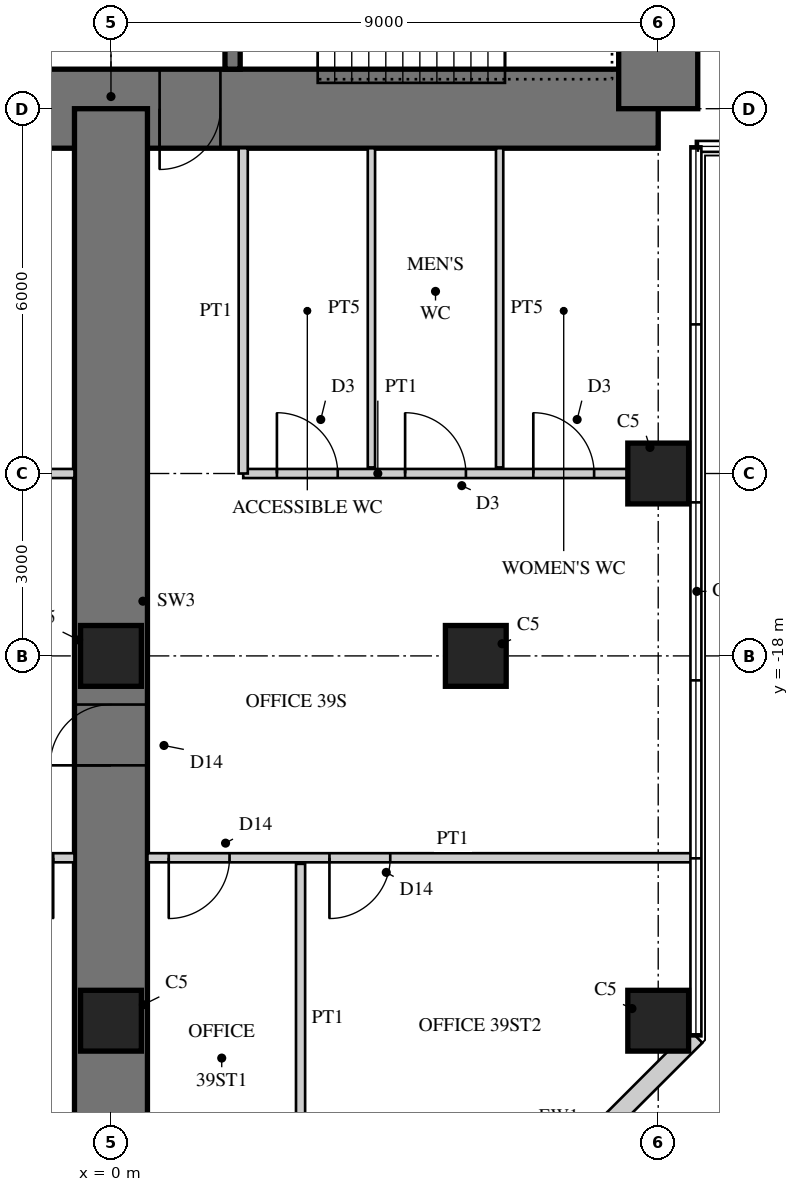
"""IFC4 building model, lengths in metres.
Left out: names, types, materials, properties, quantities, classifications, styles, units other than length and angle.
Written with IfcOpenShell. Run it as: python <this file> out.ifc"""

import sys

from ifc_helpers import new_model, si_unit, direction, frame, frame_2d, origin, origin_2d, place, context, subcontext, project, spatial, rectangle, extrude, element, fill, save


model = new_model("IFC4")
c1 = context("Model", 3, precision=1e-05, world=origin(), true_north=direction((0.0, 1.0)))
c2 = subcontext(c1, "Body", "Model", "MODEL_VIEW")
j1 = project(units=[si_unit("LENGTHUNIT", "METRE"), si_unit("PLANEANGLEUNIT", "RADIAN")], contexts=[c1])
p1 = place(None, origin())
s1 = spatial("IfcSite", under=j1, at=p1, CompositionType="ELEMENT")
p2 = place(p1, origin())
s2 = spatial("IfcBuilding", under=s1, at=p2, CompositionType="ELEMENT")
p3 = place(p2, frame((0.0, 0.0, 160.5)))
s3 = spatial("IfcBuildingStorey", under=s2, at=p3, CompositionType="ELEMENT", Elevation=160.5)
p4 = place(p3, frame((-9.0, -9.0, 0.0), z_axis=(0.0, 0.0, 1.0), x_axis=(1.0, 0.0, 0.0)))
e1 = element("IfcWall", 1, at=p4, inside=s3, PredefinedType="SHEAR", context=c2, shape_type="SweptSolid", body=[
    extrude(rectangle(XDim=18.0, YDim=1.3, at=frame_2d((9.0, 0.0))), origin(), (0.0, 0.0, 1.0), 4.0),
])
p5 = place(p4, frame((9.8, 0.0, 0.0)))
e2 = element("IfcOpeningElement", 2, at=p5, cuts=e1, PredefinedType="OPENING", context=c2, shape_type="SweptSolid", body=[
    extrude(rectangle(XDim=1.0, YDim=2.4, at=frame_2d((0.5, 1.2))), frame((0.0, 0.66, 0.0), z_axis=(0.0, -1.0, 0.0), x_axis=(1.0, 0.0, 0.0)), (0.0, 0.0, 1.0), 1.32),
])
p6 = place(p3, frame((9.0, -9.0, 0.0), z_axis=(0.0, 0.0, 1.0), x_axis=(0.0, 1.0, 0.0)))
e3 = element("IfcWall", 3, at=p6, inside=s3, PredefinedType="SHEAR", context=c2, shape_type="SweptSolid", body=[
    extrude(rectangle(XDim=18.0, YDim=1.3, at=frame_2d((9.0, 0.0))), origin(), (0.0, 0.0, 1.0), 4.0),
])
p7 = place(p6, frame((9.8, 0.0, 0.0)))
e4 = element("IfcOpeningElement", 4, at=p7, cuts=e3, PredefinedType="OPENING", context=c2, shape_type="SweptSolid", body=[
    extrude(rectangle(XDim=1.0, YDim=2.4, at=frame_2d((0.5, 1.2))), frame((0.0, 0.66, 0.0), z_axis=(0.0, -1.0, 0.0), x_axis=(1.0, 0.0, 0.0)), (0.0, 0.0, 1.0), 1.32),
])
p8 = place(p3, frame((2.0, -1.675, 0.0), z_axis=(0.0, 0.0, 1.0), x_axis=(0.0, -1.0, 0.0)))
e5 = element("IfcWall", 5, at=p8, inside=s3, PredefinedType="SHEAR", context=c2, shape_type="SweptSolid", body=[
    extrude(rectangle(XDim=6.675, YDim=0.25, at=frame_2d((3.337, 0.0))), origin(), (0.0, 0.0, 1.0), 4.0),
])
p9 = place(p8, frame((0.725, 0.0, 0.0)))
e6 = element("IfcOpeningElement", 6, at=p9, cuts=e5, PredefinedType="OPENING", context=c2, shape_type="SweptSolid", body=[
    extrude(rectangle(XDim=1.0, YDim=2.1, at=frame_2d((0.5, 1.05))), frame((0.0, 0.135, 0.0), z_axis=(0.0, -1.0, 0.0), x_axis=(1.0, 0.0, 0.0)), (0.0, 0.0, 1.0), 0.27),
])
p10 = place(p3, frame((0.0, -9.0, 0.0), z_axis=(0.0, 0.0, 1.0), x_axis=(0.0, -1.0, 0.0)))
e7 = element("IfcWall", 7, at=p10, inside=s3, PredefinedType="SHEAR", context=c2, shape_type="SweptSolid", body=[
    extrude(rectangle(XDim=18.0, YDim=1.2, at=frame_2d((9.0, 0.0))), origin(), (0.0, 0.0, 1.0), 4.0),
])
p11 = place(p10, frame((9.8, 0.0, 0.0)))
e8 = element("IfcOpeningElement", 8, at=p11, cuts=e7, PredefinedType="OPENING", context=c2, shape_type="SweptSolid", body=[
    extrude(rectangle(XDim=1.0, YDim=2.2, at=frame_2d((0.5, 1.1))), frame((0.0, 0.61, 0.0), z_axis=(0.0, -1.0, 0.0), x_axis=(1.0, 0.0, 0.0)), (0.0, 0.0, 1.0), 1.22),
])
for number, where, z_axis, x_axis in (
    (9, (9.0, -15.0, 0.0), (0.0, 0.0, 1.0), (1.0, 0.0, 0.0)),
    (10, (9.0, -24.0, 0.0), (0.0, 0.0, 1.0), (1.0, 0.0, 0.0)),
    (11, (0.0, -18.0, 0.0), (0.0, 0.0, 1.0), (1.0, 0.0, 0.0)),
    (12, (6.0, -18.0, 0.0), (0.0, 0.0, 1.0), (1.0, 0.0, 0.0)),
    (13, (0.0, -24.0, 0.0), (0.0, 0.0, 1.0), (1.0, 0.0, 0.0)),
):
    element("IfcColumn", number, at=place(p3, frame(where, z_axis=z_axis, x_axis=x_axis)), inside=s3, PredefinedType="COLUMN", context=c2, shape_type="SweptSolid", body=[
        extrude(rectangle(XDim=1.0, YDim=1.0, at=origin_2d()), origin(), (0.0, 0.0, 1.0), 4.0),
    ])
p12 = place(p3, frame((6.277, -27.6, 0.0), z_axis=(0.0, 0.0, 1.0), x_axis=(0.707106781187, 0.707106781187, 0.0)))
e14 = element("IfcWall", 14, at=p12, inside=s3, PredefinedType="SOLIDWALL", context=c2, shape_type="SweptSolid", body=[
    extrude(rectangle(XDim=4.728, YDim=0.3, at=frame_2d((2.364, 0.0))), origin(), (0.0, 0.0, 1.0), 3.75),
])
p13 = place(p12, frame((1.914, 0.0, 0.3)))
e15 = element("IfcOpeningElement", 15, at=p13, cuts=e14, PredefinedType="OPENING", context=c2, shape_type="SweptSolid", body=[
    extrude(rectangle(XDim=0.9, YDim=2.4, at=frame_2d((0.45, 1.2))), frame((0.0, 0.16, 0.0), z_axis=(0.0, -1.0, 0.0), x_axis=(1.0, 0.0, 0.0)), (0.0, 0.0, 1.0), 0.32),
])
p14 = place(p3, frame((2.175, -15.0, 0.0), z_axis=(0.0, 0.0, 1.0), x_axis=(1.0, 0.0, 0.0)))
e16 = element("IfcWall", 16, at=p14, inside=s3, PredefinedType="PARTITIONING", context=c2, shape_type="SweptSolid", body=[
    extrude(rectangle(XDim=6.325, YDim=0.15, at=frame_2d((3.163, 0.0))), origin(), (0.0, 0.0, 1.0), 2.7),
])
p15 = place(p14, frame((0.554, 0.0, 0.0)))
e17 = element("IfcOpeningElement", 17, at=p15, cuts=e16, PredefinedType="OPENING", context=c2, shape_type="SweptSolid", body=[
    extrude(rectangle(XDim=1.0, YDim=2.1, at=frame_2d((0.5, 1.05))), frame((0.0, 0.085, 0.0), z_axis=(0.0, -1.0, 0.0), x_axis=(1.0, 0.0, 0.0)), (0.0, 0.0, 1.0), 0.17),
])
p16 = place(p14, frame((2.663, 0.0, 0.0)))
e18 = element("IfcOpeningElement", 18, at=p16, cuts=e16, PredefinedType="OPENING", context=c2, shape_type="SweptSolid", body=[
    extrude(rectangle(XDim=1.0, YDim=2.1, at=frame_2d((0.5, 1.05))), frame((0.0, 0.085, 0.0), z_axis=(0.0, -1.0, 0.0), x_axis=(1.0, 0.0, 0.0)), (0.0, 0.0, 1.0), 0.17),
])
p17 = place(p14, frame((4.771, 0.0, 0.0)))
e19 = element("IfcOpeningElement", 19, at=p17, cuts=e16, PredefinedType="OPENING", context=c2, shape_type="SweptSolid", body=[
    extrude(rectangle(XDim=1.0, YDim=2.1, at=frame_2d((0.5, 1.05))), frame((0.0, 0.085, 0.0), z_axis=(0.0, -1.0, 0.0), x_axis=(1.0, 0.0, 0.0)), (0.0, 0.0, 1.0), 0.17),
])
p18 = place(p3, frame((2.175, -9.65, 0.0), z_axis=(0.0, 0.0, 1.0), x_axis=(0.0, -1.0, 0.0)))
e20 = element("IfcWall", 20, at=p18, inside=s3, PredefinedType="PARTITIONING", context=c2, shape_type="SweptSolid", body=[
    extrude(rectangle(XDim=5.35, YDim=0.15, at=frame_2d((2.675, 0.0))), origin(), (0.0, 0.0, 1.0), 3.75),
])
for number, where, z_axis, x_axis in (
    (21, (4.283, -9.65, 0.0), (0.0, 0.0, 1.0), (0.0, -1.0, 0.0)),
    (22, (6.392, -9.65, 0.0), (0.0, 0.0, 1.0), (0.0, -1.0, 0.0)),
):
    element("IfcWall", number, at=place(p3, frame(where, z_axis=z_axis, x_axis=x_axis)), inside=s3, PredefinedType="PLUMBINGWALL", context=c2, shape_type="SweptSolid", body=[
        extrude(rectangle(XDim=5.25, YDim=0.12, at=frame_2d((2.625, 0.0))), origin(), (0.0, 0.0, 1.0), 3.75),
    ])
p19 = place(p3, frame((-8.5, -15.0, 0.0), z_axis=(0.0, 0.0, 1.0), x_axis=(1.0, 0.0, 0.0)))
e23 = element("IfcWall", 23, at=p19, inside=s3, PredefinedType="PARTITIONING", context=c2, shape_type="SweptSolid", body=[
    extrude(rectangle(XDim=7.9, YDim=0.15, at=frame_2d((3.95, 0.0))), origin(), (0.0, 0.0, 1.0), 2.7),
])
p20 = place(p19, frame((1.45, 0.0, 0.0)))
e24 = element("IfcOpeningElement", 24, at=p20, cuts=e23, PredefinedType="OPENING", context=c2, shape_type="SweptSolid", body=[
    extrude(rectangle(XDim=1.0, YDim=2.1, at=frame_2d((0.5, 1.05))), frame((0.0, 0.085, 0.0), z_axis=(0.0, -1.0, 0.0), x_axis=(1.0, 0.0, 0.0)), (0.0, 0.0, 1.0), 0.17),
])
p21 = place(p19, frame((5.4, 0.0, 0.0)))
e25 = element("IfcOpeningElement", 25, at=p21, cuts=e23, PredefinedType="OPENING", context=c2, shape_type="SweptSolid", body=[
    extrude(rectangle(XDim=1.0, YDim=2.1, at=frame_2d((0.5, 1.05))), frame((0.0, 0.085, 0.0), z_axis=(0.0, -1.0, 0.0), x_axis=(1.0, 0.0, 0.0)), (0.0, 0.0, 1.0), 0.17),
])
p22 = place(p3, frame((3.118, -21.42, 0.0), z_axis=(0.0, 0.0, 1.0), x_axis=(0.0, -1.0, 0.0)))
e26 = element("IfcWall", 26, at=p22, inside=s3, PredefinedType="PARTITIONING", context=c2, shape_type="SweptSolid", body=[
    extrude(rectangle(XDim=5.08, YDim=0.15, at=frame_2d((2.54, 0.0))), origin(), (0.0, 0.0, 1.0), 3.75),
])
p23 = place(p3, frame((0.6, -21.32, 0.0), z_axis=(0.0, 0.0, 1.0), x_axis=(1.0, 0.0, 0.0)))
e27 = element("IfcWall", 27, at=p23, inside=s3, PredefinedType="PARTITIONING", context=c2, shape_type="SweptSolid", body=[
    extrude(rectangle(XDim=8.98, YDim=0.15, at=frame_2d((4.49, 0.0))), origin(), (0.0, 0.0, 1.0), 3.75),
])
p24 = place(p23, frame((0.35, 0.0, 0.0)))
e28 = element("IfcOpeningElement", 28, at=p24, cuts=e27, PredefinedType="OPENING", context=c2, shape_type="SweptSolid", body=[
    extrude(rectangle(XDim=1.0, YDim=2.2, at=frame_2d((0.5, 1.1))), frame((0.0, 0.085, 0.0), z_axis=(0.0, -1.0, 0.0), x_axis=(1.0, 0.0, 0.0)), (0.0, 0.0, 1.0), 0.17),
])
p25 = place(p23, frame((2.993, 0.0, 0.0)))
e29 = element("IfcOpeningElement", 29, at=p25, cuts=e27, PredefinedType="OPENING", context=c2, shape_type="SweptSolid", body=[
    extrude(rectangle(XDim=1.0, YDim=2.2, at=frame_2d((0.5, 1.1))), frame((0.0, 0.085, 0.0), z_axis=(0.0, -1.0, 0.0), x_axis=(1.0, 0.0, 0.0)), (0.0, 0.0, 1.0), 0.17),
])
p26 = place(p3, frame((-9.58, -21.32, 0.0), z_axis=(0.0, 0.0, 1.0), x_axis=(1.0, 0.0, 0.0)))
e30 = element("IfcWall", 30, at=p26, inside=s3, PredefinedType="PARTITIONING", context=c2, shape_type="SweptSolid", body=[
    extrude(rectangle(XDim=8.98, YDim=0.15, at=frame_2d((4.49, 0.0))), origin(), (0.0, 0.0, 1.0), 3.75),
])
p27 = place(p26, frame((4.987, 0.0, 0.0)))
e31 = element("IfcOpeningElement", 31, at=p27, cuts=e30, PredefinedType="OPENING", context=c2, shape_type="SweptSolid", body=[
    extrude(rectangle(XDim=1.0, YDim=2.2, at=frame_2d((0.5, 1.1))), frame((0.0, 0.085, 0.0), z_axis=(0.0, -1.0, 0.0), x_axis=(1.0, 0.0, 0.0)), (0.0, 0.0, 1.0), 0.17),
])
p28 = place(p26, frame((7.63, 0.0, 0.0)))
e32 = element("IfcOpeningElement", 32, at=p28, cuts=e30, PredefinedType="OPENING", context=c2, shape_type="SweptSolid", body=[
    extrude(rectangle(XDim=1.0, YDim=2.2, at=frame_2d((0.5, 1.1))), frame((0.0, 0.085, 0.0), z_axis=(0.0, -1.0, 0.0), x_axis=(1.0, 0.0, 0.0)), (0.0, 0.0, 1.0), 0.17),
])
p29 = place(p15, origin())
e33 = element("IfcDoor", 33, at=p29, inside=s3, OperationType="SINGLE_SWING_LEFT", PredefinedType="DOOR", context=c2, shape_type="SweptSolid", body=[
    extrude(rectangle(XDim=1.0, YDim=2.1, at=frame_2d((0.5, 1.05))), frame((0.0, 0.025, 0.0), z_axis=(0.0, -1.0, 0.0), x_axis=(1.0, 0.0, 0.0)), (0.0, 0.0, 1.0), 0.05),
])
fill(e17, e33)
p30 = place(p16, origin())
e34 = element("IfcDoor", 34, at=p30, inside=s3, OperationType="SINGLE_SWING_LEFT", PredefinedType="DOOR", context=c2, shape_type="SweptSolid", body=[
    extrude(rectangle(XDim=1.0, YDim=2.1, at=frame_2d((0.5, 1.05))), frame((0.0, 0.025, 0.0), z_axis=(0.0, -1.0, 0.0), x_axis=(1.0, 0.0, 0.0)), (0.0, 0.0, 1.0), 0.05),
])
fill(e18, e34)
p31 = place(p17, origin())
e35 = element("IfcDoor", 35, at=p31, inside=s3, OperationType="SINGLE_SWING_LEFT", PredefinedType="DOOR", context=c2, shape_type="SweptSolid", body=[
    extrude(rectangle(XDim=1.0, YDim=2.1, at=frame_2d((0.5, 1.05))), frame((0.0, 0.025, 0.0), z_axis=(0.0, -1.0, 0.0), x_axis=(1.0, 0.0, 0.0)), (0.0, 0.0, 1.0), 0.05),
])
fill(e19, e35)
p32 = place(p24, frame((1.0, 0.0, 0.0), z_axis=(0.0, 0.0, 1.0), x_axis=(-1.0, 0.0, 0.0)))
e36 = element("IfcDoor", 36, at=p32, inside=s3, OperationType="SINGLE_SWING_RIGHT", PredefinedType="DOOR", context=c2, shape_type="SweptSolid", body=[
    extrude(rectangle(XDim=1.0, YDim=2.2, at=frame_2d((0.5, 1.1))), frame((0.0, 0.025, 0.0), z_axis=(0.0, -1.0, 0.0), x_axis=(1.0, 0.0, 0.0)), (0.0, 0.0, 1.0), 0.05),
])
fill(e28, e36)
p33 = place(p25, frame((1.0, 0.0, 0.0), z_axis=(0.0, 0.0, 1.0), x_axis=(-1.0, 0.0, 0.0)))
e37 = element("IfcDoor", 37, at=p33, inside=s3, OperationType="SINGLE_SWING_RIGHT", PredefinedType="DOOR", context=c2, shape_type="SweptSolid", body=[
    extrude(rectangle(XDim=1.0, YDim=2.2, at=frame_2d((0.5, 1.1))), frame((0.0, 0.025, 0.0), z_axis=(0.0, -1.0, 0.0), x_axis=(1.0, 0.0, 0.0)), (0.0, 0.0, 1.0), 0.05),
])
fill(e29, e37)
p34 = place(p28, frame((1.0, 0.0, 0.0), z_axis=(0.0, 0.0, 1.0), x_axis=(-1.0, 0.0, 0.0)))
e38 = element("IfcDoor", 38, at=p34, inside=s3, OperationType="SINGLE_SWING_LEFT", PredefinedType="DOOR", context=c2, shape_type="SweptSolid", body=[
    extrude(rectangle(XDim=1.0, YDim=2.2, at=frame_2d((0.5, 1.1))), frame((0.0, 0.025, 0.0), z_axis=(0.0, -1.0, 0.0), x_axis=(1.0, 0.0, 0.0)), (0.0, 0.0, 1.0), 0.05),
])
fill(e32, e38)
p35 = place(p11, frame((1.0, 0.0, 0.0), z_axis=(0.0, 0.0, 1.0), x_axis=(-1.0, 0.0, 0.0)))
e39 = element("IfcDoor", 39, at=p35, inside=s3, OperationType="SINGLE_SWING_LEFT", PredefinedType="DOOR", context=c2, shape_type="SweptSolid", body=[
    extrude(rectangle(XDim=1.0, YDim=2.2, at=frame_2d((0.5, 1.1))), frame((0.0, 0.025, 0.0), z_axis=(0.0, -1.0, 0.0), x_axis=(1.0, 0.0, 0.0)), (0.0, 0.0, 1.0), 0.05),
])
fill(e8, e39)
p36 = place(p5, frame((1.0, 0.0, 0.0), z_axis=(0.0, 0.0, 1.0), x_axis=(-1.0, 0.0, 0.0)))
e40 = element("IfcDoor", 40, at=p36, inside=s3, OperationType="SINGLE_SWING_RIGHT", PredefinedType="DOOR", context=c2, shape_type="SweptSolid", body=[
    extrude(rectangle(XDim=1.0, YDim=2.4, at=frame_2d((0.5, 1.2))), frame((0.0, -0.005, 0.0), z_axis=(0.0, -1.0, 0.0), x_axis=(1.0, 0.0, 0.0)), (0.0, 0.0, 1.0), 0.05),
])
fill(e2, e40)
save(model, sys.argv[1])
